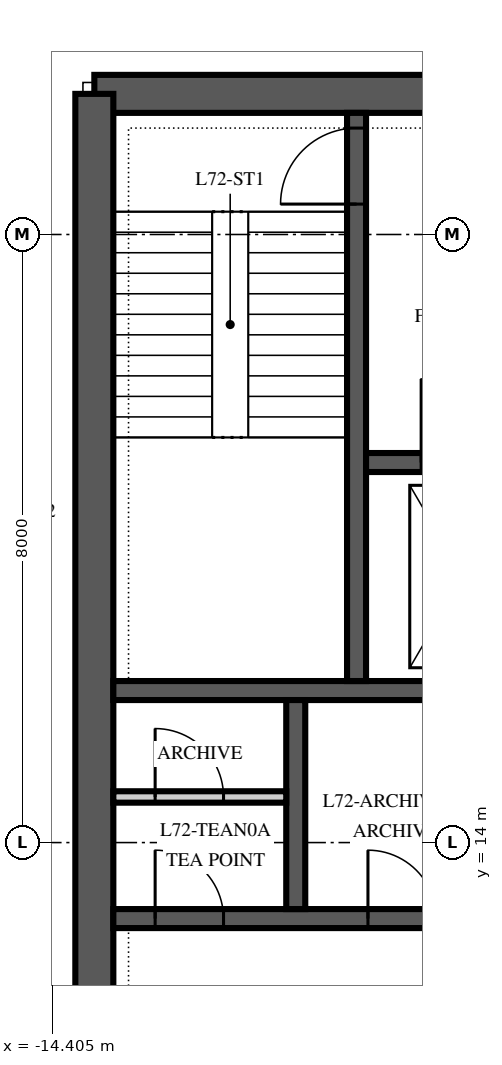
"""IFC4 building model, lengths in metres.
Left out: names, types, materials, properties, quantities, classifications, styles, units other than length and angle.
Written with IfcOpenShell. Run it as: python <this file> out.ifc"""

import sys

from ifc_helpers import new_model, si_unit, direction, frame, frame_2d, origin, place, context, subcontext, project, spatial, polyline, rectangle, outline, extrude, element, fill, save


model = new_model("IFC4")
c1 = context("Model", 3, precision=1e-05, world=origin(), true_north=direction((0.0, 1.0)))
c2 = subcontext(c1, "Body", "Model", "MODEL_VIEW")
j1 = project(units=[si_unit("LENGTHUNIT", "METRE"), si_unit("PLANEANGLEUNIT", "RADIAN")], contexts=[c1])
p1 = place(None, origin())
s1 = spatial("IfcSite", under=j1, at=p1, CompositionType="ELEMENT")
p2 = place(p1, origin())
s2 = spatial("IfcBuilding", under=s1, at=p2, CompositionType="ELEMENT")
p3 = place(p2, frame((0.0, 0.0, 308.0)))
s3 = spatial("IfcBuildingStorey", under=s2, at=p3, CompositionType="ELEMENT", Elevation=308.0)
p4 = place(p3, frame((13.85, 23.85, 0.0), z_axis=(0.0, 0.0, 1.0), x_axis=(-1.0, 0.0, 0.0)))
e1 = element("IfcWall", 1, at=p4, inside=s3, PredefinedType="SHEAR", context=c2, shape_type="SweptSolid", body=[
    extrude(rectangle(XDim=27.7, YDim=0.5, at=frame_2d((13.85, 0.0))), origin(), (0.0, 0.0, 1.0), 4.0),
])
p5 = place(p4, frame((21.75, 0.0, 0.0)))
e2 = element("IfcOpeningElement", 2, at=p5, cuts=e1, PredefinedType="OPENING", context=c2, shape_type="SweptSolid", body=[
    extrude(rectangle(XDim=1.0, YDim=2.1, at=frame_2d((0.5, 1.05))), frame((0.0, 0.265, 0.0), z_axis=(0.0, -1.0, 0.0), x_axis=(1.0, 0.0, 0.0)), (0.0, 0.0, 1.0), 0.53),
])
p6 = place(p4, frame((4.95, 0.0, 0.0)))
e3 = element("IfcOpeningElement", 3, at=p6, cuts=e1, PredefinedType="OPENING", context=c2, shape_type="SweptSolid", body=[
    extrude(rectangle(XDim=1.0, YDim=2.1, at=frame_2d((0.5, 1.05))), frame((0.0, 0.265, 0.0), z_axis=(0.0, -1.0, 0.0), x_axis=(1.0, 0.0, 0.0)), (0.0, 0.0, 1.0), 0.53),
])
p7 = place(p4, frame((17.35, 0.0, 0.0)))
e4 = element("IfcOpeningElement", 4, at=p7, cuts=e1, PredefinedType="OPENING", context=c2, shape_type="SweptSolid", body=[
    extrude(rectangle(XDim=1.0, YDim=2.1, at=frame_2d((0.5, 1.05))), frame((0.0, 0.265, 0.0), z_axis=(0.0, -1.0, 0.0), x_axis=(1.0, 0.0, 0.0)), (0.0, 0.0, 1.0), 0.53),
])
p8 = place(p4, frame((13.35, 0.0, 0.0)))
e5 = element("IfcOpeningElement", 5, at=p8, cuts=e1, PredefinedType="OPENING", context=c2, shape_type="SweptSolid", body=[
    extrude(rectangle(XDim=1.0, YDim=2.1, at=frame_2d((0.5, 1.05))), frame((0.0, 0.265, 0.0), z_axis=(0.0, -1.0, 0.0), x_axis=(1.0, 0.0, 0.0)), (0.0, 0.0, 1.0), 0.53),
])
p9 = place(p4, frame((9.35, 0.0, 0.0)))
e6 = element("IfcOpeningElement", 6, at=p9, cuts=e1, PredefinedType="OPENING", context=c2, shape_type="SweptSolid", body=[
    extrude(rectangle(XDim=1.0, YDim=2.1, at=frame_2d((0.5, 1.05))), frame((0.0, 0.265, 0.0), z_axis=(0.0, -1.0, 0.0), x_axis=(1.0, 0.0, 0.0)), (0.0, 0.0, 1.0), 0.53),
])
p10 = place(p3, frame((-13.85, 23.85, 0.0), z_axis=(0.0, 0.0, 1.0), x_axis=(0.0, -1.0, 0.0)))
e7 = element("IfcWall", 7, at=p10, inside=s3, PredefinedType="SHEAR", context=c2, shape_type="SweptSolid", body=[
    extrude(outline(polyline([(0.0, -0.25), (17.7, -0.25), (17.7, 0.0), (17.45, 0.0), (17.45, 0.25), (0.25, 0.25), (0.25, 0.0), (0.0, 0.0), (0.0, -0.25)])), origin(), (0.0, 0.0, 1.0), 4.0),
])
p11 = place(p10, frame((11.75, 0.0, 0.0)))
e8 = element("IfcOpeningElement", 8, at=p11, cuts=e7, PredefinedType="OPENING", context=c2, shape_type="SweptSolid", body=[
    extrude(rectangle(XDim=1.8, YDim=2.4, at=frame_2d((0.9, 1.2))), frame((0.0, 0.265, 0.0), z_axis=(0.0, -1.0, 0.0), x_axis=(1.0, 0.0, 0.0)), (0.0, 0.0, 1.0), 0.53),
])
p12 = place(p3, frame((-13.6, 13.0, 0.0), z_axis=(0.0, 0.0, 1.0), x_axis=(1.0, 0.0, 0.0)))
e9 = element("IfcWall", 9, at=p12, inside=s3, PredefinedType="SHEAR", context=c2, shape_type="SweptSolid", body=[
    extrude(rectangle(XDim=27.2, YDim=0.25, at=frame_2d((13.6, 0.0))), origin(), (0.0, 0.0, 1.0), 4.0),
])
p13 = place(p12, frame((15.15, 0.0, 0.0)))
e10 = element("IfcOpeningElement", 10, at=p13, cuts=e9, PredefinedType="OPENING", context=c2, shape_type="SweptSolid", body=[
    extrude(rectangle(XDim=0.9, YDim=2.1, at=frame_2d((0.45, 1.05))), frame((0.0, 0.14, 0.0), z_axis=(0.0, -1.0, 0.0), x_axis=(1.0, 0.0, 0.0)), (0.0, 0.0, 1.0), 0.28),
])
p14 = place(p12, frame((17.55, 0.0, 0.0)))
e11 = element("IfcOpeningElement", 11, at=p14, cuts=e9, PredefinedType="OPENING", context=c2, shape_type="SweptSolid", body=[
    extrude(rectangle(XDim=0.9, YDim=2.1, at=frame_2d((0.45, 1.05))), frame((0.0, 0.14, 0.0), z_axis=(0.0, -1.0, 0.0), x_axis=(1.0, 0.0, 0.0)), (0.0, 0.0, 1.0), 0.28),
])
p15 = place(p12, frame((21.15, 0.0, 0.0)))
e12 = element("IfcOpeningElement", 12, at=p15, cuts=e9, PredefinedType="OPENING", context=c2, shape_type="SweptSolid", body=[
    extrude(rectangle(XDim=0.9, YDim=2.1, at=frame_2d((0.45, 1.05))), frame((0.0, 0.14, 0.0), z_axis=(0.0, -1.0, 0.0), x_axis=(1.0, 0.0, 0.0)), (0.0, 0.0, 1.0), 0.28),
])
p16 = place(p12, frame((0.55, 0.0, 0.0)))
e13 = element("IfcOpeningElement", 13, at=p16, cuts=e9, PredefinedType="OPENING", context=c2, shape_type="SweptSolid", body=[
    extrude(rectangle(XDim=0.9, YDim=2.1, at=frame_2d((0.45, 1.05))), frame((0.0, 0.14, 0.0), z_axis=(0.0, -1.0, 0.0), x_axis=(1.0, 0.0, 0.0)), (0.0, 0.0, 1.0), 0.28),
])
p17 = place(p12, frame((3.35, 0.0, 0.0)))
e14 = element("IfcOpeningElement", 14, at=p17, cuts=e9, PredefinedType="OPENING", context=c2, shape_type="SweptSolid", body=[
    extrude(rectangle(XDim=0.9, YDim=2.1, at=frame_2d((0.45, 1.05))), frame((0.0, 0.14, 0.0), z_axis=(0.0, -1.0, 0.0), x_axis=(1.0, 0.0, 0.0)), (0.0, 0.0, 1.0), 0.28),
])
p18 = place(p12, frame((6.15, 0.0, 0.0)))
e15 = element("IfcOpeningElement", 15, at=p18, cuts=e9, PredefinedType="OPENING", context=c2, shape_type="SweptSolid", body=[
    extrude(rectangle(XDim=0.9, YDim=2.1, at=frame_2d((0.45, 1.05))), frame((0.0, 0.14, 0.0), z_axis=(0.0, -1.0, 0.0), x_axis=(1.0, 0.0, 0.0)), (0.0, 0.0, 1.0), 0.28),
])
p19 = place(p3, frame((-13.6, 16.0, 0.0), z_axis=(0.0, 0.0, 1.0), x_axis=(1.0, 0.0, 0.0)))
e16 = element("IfcWall", 16, at=p19, inside=s3, PredefinedType="SHEAR", context=c2, shape_type="SweptSolid", body=[
    extrude(rectangle(XDim=27.2, YDim=0.25, at=frame_2d((13.6, 0.0))), origin(), (0.0, 0.0, 1.0), 4.0),
])
p20 = place(p3, frame((-11.2, 13.125, 0.0), z_axis=(0.0, 0.0, 1.0), x_axis=(0.0, 1.0, 0.0)))
e17 = element("IfcWall", 17, at=p20, inside=s3, PredefinedType="SHEAR", context=c2, shape_type="SweptSolid", body=[
    extrude(rectangle(XDim=2.75, YDim=0.25, at=frame_2d((1.375, 0.0))), origin(), (0.0, 0.0, 1.0), 4.0),
])
p21 = place(p3, frame((-10.4, 16.125, 0.0), z_axis=(0.0, 0.0, 1.0), x_axis=(0.0, 1.0, 0.0)))
e18 = element("IfcWall", 18, at=p21, inside=s3, PredefinedType="SHEAR", context=c2, shape_type="SweptSolid", body=[
    extrude(rectangle(XDim=7.475, YDim=0.25, at=frame_2d((3.738, 0.0))), origin(), (0.0, 0.0, 1.0), 4.0),
])
p22 = place(p21, frame((6.275, 0.0, 0.0)))
e19 = element("IfcOpeningElement", 19, at=p22, cuts=e18, PredefinedType="OPENING", context=c2, shape_type="SweptSolid", body=[
    extrude(rectangle(XDim=1.0, YDim=2.1, at=frame_2d((0.5, 1.05))), frame((0.0, 0.14, 0.0), z_axis=(0.0, -1.0, 0.0), x_axis=(1.0, 0.0, 0.0)), (0.0, 0.0, 1.0), 0.28),
])
p23 = place(p3, frame((-10.275, 19.0, 0.0), z_axis=(0.0, 0.0, 1.0), x_axis=(1.0, 0.0, 0.0)))
e20 = element("IfcWall", 20, at=p23, inside=s3, PredefinedType="SHEAR", context=c2, shape_type="SweptSolid", body=[
    extrude(rectangle(XDim=3.75, YDim=0.25, at=frame_2d((1.875, 0.0))), origin(), (0.0, 0.0, 1.0), 4.0),
])
p24 = place(p23, frame((0.725, 0.0, 0.0)))
e21 = element("IfcOpeningElement", 21, at=p24, cuts=e20, PredefinedType="OPENING", context=c2, shape_type="SweptSolid", body=[
    extrude(rectangle(XDim=1.1, YDim=2.1, at=frame_2d((0.55, 1.05))), frame((0.0, 0.14, 0.0), z_axis=(0.0, -1.0, 0.0), x_axis=(1.0, 0.0, 0.0)), (0.0, 0.0, 1.0), 0.28),
])
p25 = place(p3, frame((-13.6, 14.6, 0.0), z_axis=(0.0, 0.0, 1.0), x_axis=(1.0, 0.0, 0.0)))
e22 = element("IfcWall", 22, at=p25, inside=s3, PredefinedType="PARTITIONING", context=c2, shape_type="SweptSolid", body=[
    extrude(rectangle(XDim=2.275, YDim=0.15, at=frame_2d((1.138, 0.0))), origin(), (0.0, 0.0, 1.0), 3.85),
])
p26 = place(p25, frame((0.55, 0.0, 0.0)))
e23 = element("IfcOpeningElement", 23, at=p26, cuts=e22, PredefinedType="OPENING", context=c2, shape_type="SweptSolid", body=[
    extrude(rectangle(XDim=0.9, YDim=2.1, at=frame_2d((0.45, 1.05))), frame((0.0, 0.09, 0.0), z_axis=(0.0, -1.0, 0.0), x_axis=(1.0, 0.0, 0.0)), (0.0, 0.0, 1.0), 0.18),
])
p27 = place(p22, origin())
e24 = element("IfcDoor", 24, at=p27, inside=s3, OperationType="SINGLE_SWING_LEFT", PredefinedType="DOOR", context=c2, shape_type="SweptSolid", body=[
    extrude(rectangle(XDim=1.0, YDim=2.1, at=frame_2d((0.5, 1.05))), frame((0.0, 0.125, 0.0), z_axis=(0.0, -1.0, 0.0), x_axis=(1.0, 0.0, 0.0)), (0.0, 0.0, 1.0), 0.25),
])
fill(e19, e24)
p28 = place(p24, origin())
e25 = element("IfcDoor", 25, at=p28, inside=s3, OperationType="SLIDING_TO_RIGHT", PredefinedType="DOOR", context=c2, shape_type="SweptSolid", body=[
    extrude(rectangle(XDim=1.1, YDim=2.1, at=frame_2d((0.55, 1.05))), frame((0.0, 0.125, 0.0), z_axis=(0.0, -1.0, 0.0), x_axis=(1.0, 0.0, 0.0)), (0.0, 0.0, 1.0), 0.25),
])
fill(e21, e25)
p29 = place(p16, origin())
e26 = element("IfcDoor", 26, at=p29, inside=s3, OperationType="SINGLE_SWING_LEFT", PredefinedType="DOOR", context=c2, shape_type="SweptSolid", body=[
    extrude(rectangle(XDim=0.9, YDim=2.1, at=frame_2d((0.45, 1.05))), frame((0.0, 0.125, 0.0), z_axis=(0.0, -1.0, 0.0), x_axis=(1.0, 0.0, 0.0)), (0.0, 0.0, 1.0), 0.25),
])
fill(e13, e26)
p30 = place(p26, origin())
e27 = element("IfcDoor", 27, at=p30, inside=s3, OperationType="SINGLE_SWING_LEFT", PredefinedType="DOOR", context=c2, shape_type="SweptSolid", body=[
    extrude(rectangle(XDim=0.9, YDim=2.1, at=frame_2d((0.45, 1.05))), frame((0.0, 0.075, 0.0), z_axis=(0.0, -1.0, 0.0), x_axis=(1.0, 0.0, 0.0)), (0.0, 0.0, 1.0), 0.149),
])
fill(e23, e27)
p31 = place(p17, origin())
e28 = element("IfcDoor", 28, at=p31, inside=s3, OperationType="SINGLE_SWING_LEFT", PredefinedType="DOOR", context=c2, shape_type="SweptSolid", body=[
    extrude(rectangle(XDim=0.9, YDim=2.1, at=frame_2d((0.45, 1.05))), frame((0.0, 0.125, 0.0), z_axis=(0.0, -1.0, 0.0), x_axis=(1.0, 0.0, 0.0)), (0.0, 0.0, 1.0), 0.25),
])
fill(e14, e28)
save(model, sys.argv[1])
